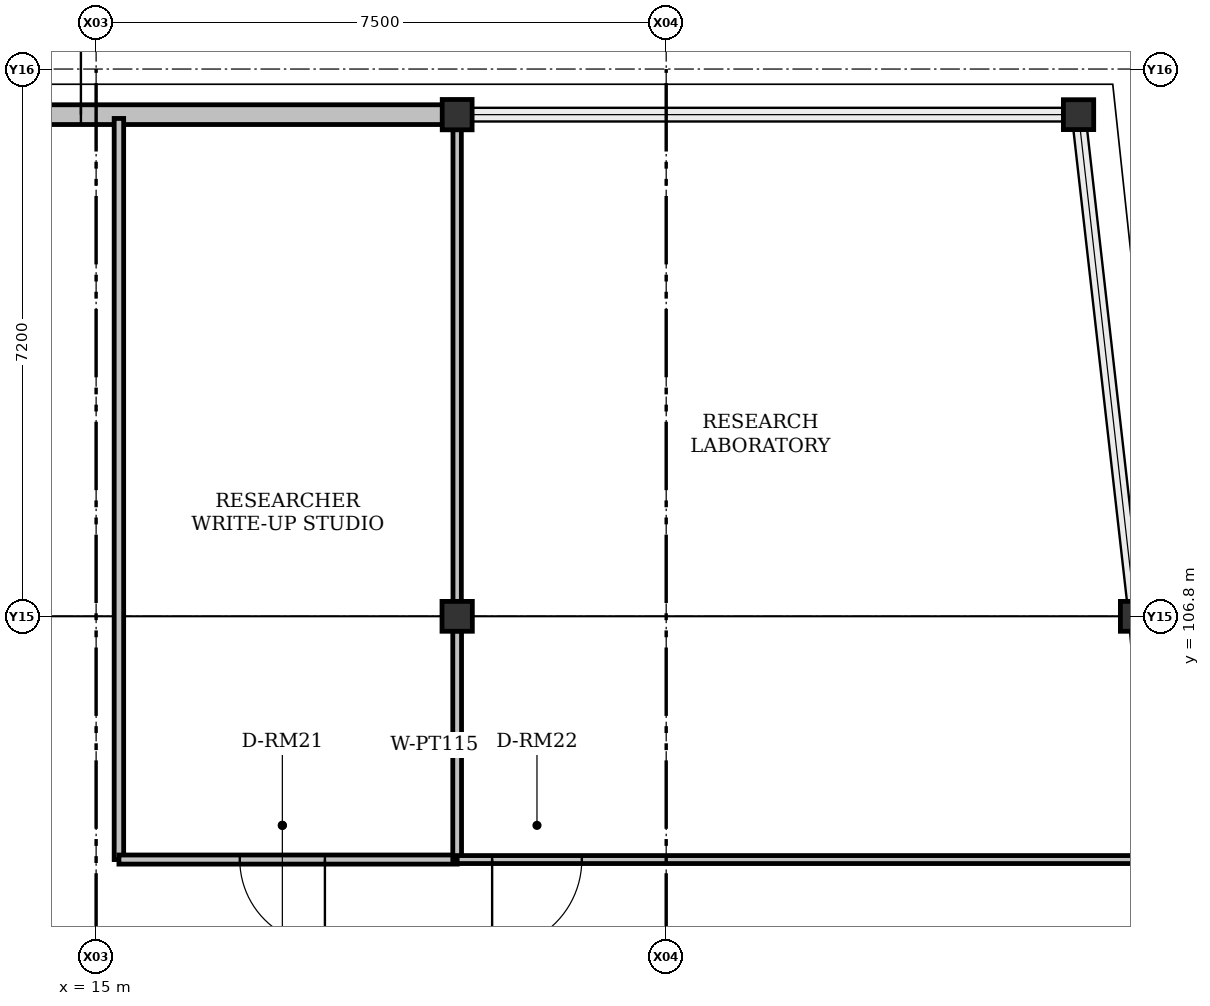
"""IFC4 building model, lengths in metres.
Left out: names, types, materials, properties, quantities, classifications, styles, units other than length and angle.
Written with IfcOpenShell. Run it as: python <this file> out.ifc"""

import sys

from ifc_helpers import new_model, si_unit, direction, frame, frame_2d, origin, origin_2d, place, context, subcontext, project, spatial, rectangle, i_section, extrude, element, fill, save


model = new_model("IFC4")
c1 = context("Model", 3, precision=1e-05, world=origin(), true_north=direction((0.0, 1.0)))
c2 = subcontext(c1, "Body", "Model", "MODEL_VIEW")
j1 = project(units=[si_unit("LENGTHUNIT", "METRE"), si_unit("PLANEANGLEUNIT", "RADIAN")], contexts=[c1])
p1 = place(None, origin())
s1 = spatial("IfcSite", under=j1, at=p1, CompositionType="ELEMENT")
p2 = place(p1, origin())
s2 = spatial("IfcBuilding", under=s1, at=p2, CompositionType="ELEMENT")
p3 = place(p2, origin())
s3 = spatial("IfcBuildingStorey", under=s2, at=p3, CompositionType="ELEMENT", Elevation=0.0)
for number, where, z_axis, x_axis in (
    (1, (19.75, 106.8, 0.0), (0.0, 0.0, 1.0), (1.0, 0.0, 0.0)),
    (2, (28.675, 106.8, 0.0), (0.0, 0.0, 1.0), (1.0, 0.0, 0.0)),
    (3, (19.75, 113.4, 0.0), (0.0, 0.0, 1.0), (0.0, 1.0, 0.0)),
    (4, (27.925, 113.4, 0.0), (0.0, 0.0, 1.0), (1.0, 0.0, 0.0)),
):
    element("IfcColumn", number, at=place(p3, frame(where, z_axis=z_axis, x_axis=x_axis)), inside=s3, PredefinedType="COLUMN", context=c2, shape_type="SweptSolid", body=[
        extrude(i_section(OverallWidth=0.399, OverallDepth=0.393, WebThickness=0.023, FlangeThickness=0.036, FilletRadius=0.015, at=origin_2d()), origin(), (0.0, 0.0, 1.0), 5.4),
    ])
p4 = place(p3, frame((7.85, 113.4, 0.0), z_axis=(0.0, 0.0, 1.0), x_axis=(1.0, 0.0, 0.0)))
e5 = element("IfcWall", 5, at=p4, inside=s3, PredefinedType="SOLIDWALL", context=c2, shape_type="SweptSolid", body=[
    extrude(rectangle(XDim=11.9, YDim=0.26, at=frame_2d((5.95, 0.0))), origin(), (0.0, 0.0, 1.0), 4.7),
])
p5 = place(p4, frame((4.95, 0.0, 0.0)))
e6 = element("IfcOpeningElement", 6, at=p5, cuts=e5, PredefinedType="OPENING", context=c2, shape_type="SweptSolid", body=[
    extrude(rectangle(XDim=2.0, YDim=2.4, at=frame_2d((1.0, 1.2))), frame((0.0, 0.13, 0.0), z_axis=(0.0, -1.0, 0.0), x_axis=(1.0, 0.0, 0.0)), (0.0, 0.0, 1.0), 0.26),
])
p6 = place(p3, frame((15.3, 103.6, 0.0), z_axis=(0.0, 0.0, 1.0), x_axis=(0.0, 1.0, 0.0)))
e7 = element("IfcWall", 7, at=p6, inside=s3, PredefinedType="PARTITIONING", context=c2, shape_type="SweptSolid", body=[
    extrude(rectangle(XDim=9.75, YDim=0.125, at=frame_2d((4.875, 0.0))), origin(), (0.0, 0.0, 1.0), 4.651),
])
p7 = place(p3, frame((19.75, 103.6, 0.0), z_axis=(0.0, 0.0, 1.0), x_axis=(-1.0, 0.0, 0.0)))
e8 = element("IfcWall", 8, at=p7, inside=s3, PredefinedType="PARTITIONING", context=c2, shape_type="SweptSolid", body=[
    extrude(rectangle(XDim=4.45, YDim=0.12, at=frame_2d((2.225, 0.0))), origin(), (0.0, 0.0, 1.0), 4.727),
])
p8 = place(p7, frame((1.74, 0.0, 0.0)))
e9 = element("IfcOpeningElement", 9, at=p8, cuts=e8, PredefinedType="OPENING", context=c2, shape_type="SweptSolid", body=[
    extrude(rectangle(XDim=1.12, YDim=2.25, at=frame_2d((0.56, 1.125))), frame((0.0, 0.06, 0.0), z_axis=(0.0, -1.0, 0.0), x_axis=(1.0, 0.0, 0.0)), (0.0, 0.0, 1.0), 0.12),
])
p9 = place(p3, frame((19.75, 106.608, 0.0), z_axis=(0.0, 0.0, 1.0), x_axis=(0.0, -1.0, 0.0)))
e10 = element("IfcWall", 10, at=p9, inside=s3, PredefinedType="PARTITIONING", context=c2, shape_type="SweptSolid", body=[
    extrude(rectangle(XDim=3.008, YDim=0.115, at=frame_2d((1.504, 0.0))), origin(), (0.0, 0.0, 1.0), 4.727),
])
p10 = place(p3, frame((19.75, 113.35, 0.0), z_axis=(0.0, 0.0, 1.0), x_axis=(0.0, -1.0, 0.0)))
e11 = element("IfcWall", 11, at=p10, inside=s3, PredefinedType="PARTITIONING", context=c2, shape_type="SweptSolid", body=[
    extrude(rectangle(XDim=6.359, YDim=0.11, at=frame_2d((3.179, 0.0))), origin(), (0.0, 0.0, 1.0), 4.727),
])
p11 = place(p3, frame((28.915, 103.6, 0.0), z_axis=(0.0, 0.0, 1.0), x_axis=(-1.0, 0.0, 0.0)))
e12 = element("IfcWall", 12, at=p11, inside=s3, PredefinedType="PARTITIONING", context=c2, shape_type="SweptSolid", body=[
    extrude(rectangle(XDim=9.165, YDim=0.105, at=frame_2d((4.583, 0.0))), origin(), (0.0, 0.0, 1.0), 4.727),
])
p12 = place(p11, frame((7.525, 0.0, 0.0)))
e13 = element("IfcOpeningElement", 13, at=p12, cuts=e12, PredefinedType="OPENING", context=c2, shape_type="SweptSolid", body=[
    extrude(rectangle(XDim=1.18, YDim=2.25, at=frame_2d((0.59, 1.125))), frame((0.0, 0.052, 0.0), z_axis=(0.0, -1.0, 0.0), x_axis=(1.0, 0.0, 0.0)), (0.0, 0.0, 1.0), 0.105),
])
p13 = place(p5, origin())
e14 = element("IfcDoor", 14, at=p13, inside=s3, OperationType="DOUBLE_DOOR_SINGLE_SWING", PredefinedType="DOOR", context=c2, shape_type="SweptSolid", body=[
    extrude(rectangle(XDim=2.0, YDim=2.4, at=frame_2d((1.0, 1.2))), frame((0.0, 0.025, 0.0), z_axis=(0.0, -1.0, 0.0), x_axis=(1.0, 0.0, 0.0)), (0.0, 0.0, 1.0), 0.05),
])
fill(e6, e14)
p14 = place(p8, origin())
e15 = element("IfcDoor", 15, at=p14, inside=s3, OperationType="SINGLE_SWING_LEFT", PredefinedType="DOOR", context=c2, shape_type="SweptSolid", body=[
    extrude(rectangle(XDim=1.12, YDim=2.25, at=frame_2d((0.56, 1.125))), frame((0.0, 0.025, 0.0), z_axis=(0.0, -1.0, 0.0), x_axis=(1.0, 0.0, 0.0)), (0.0, 0.0, 1.0), 0.05),
])
fill(e9, e15)
p15 = place(p12, origin())
e16 = element("IfcDoor", 16, at=p15, inside=s3, OperationType="SINGLE_SWING_RIGHT", PredefinedType="DOOR", context=c2, shape_type="SweptSolid", body=[
    extrude(rectangle(XDim=1.18, YDim=2.25, at=frame_2d((0.59, 1.125))), frame((0.0, 0.025, 0.0), z_axis=(0.0, -1.0, 0.0), x_axis=(1.0, 0.0, 0.0)), (0.0, 0.0, 1.0), 0.05),
])
fill(e13, e16)
save(model, sys.argv[1])
